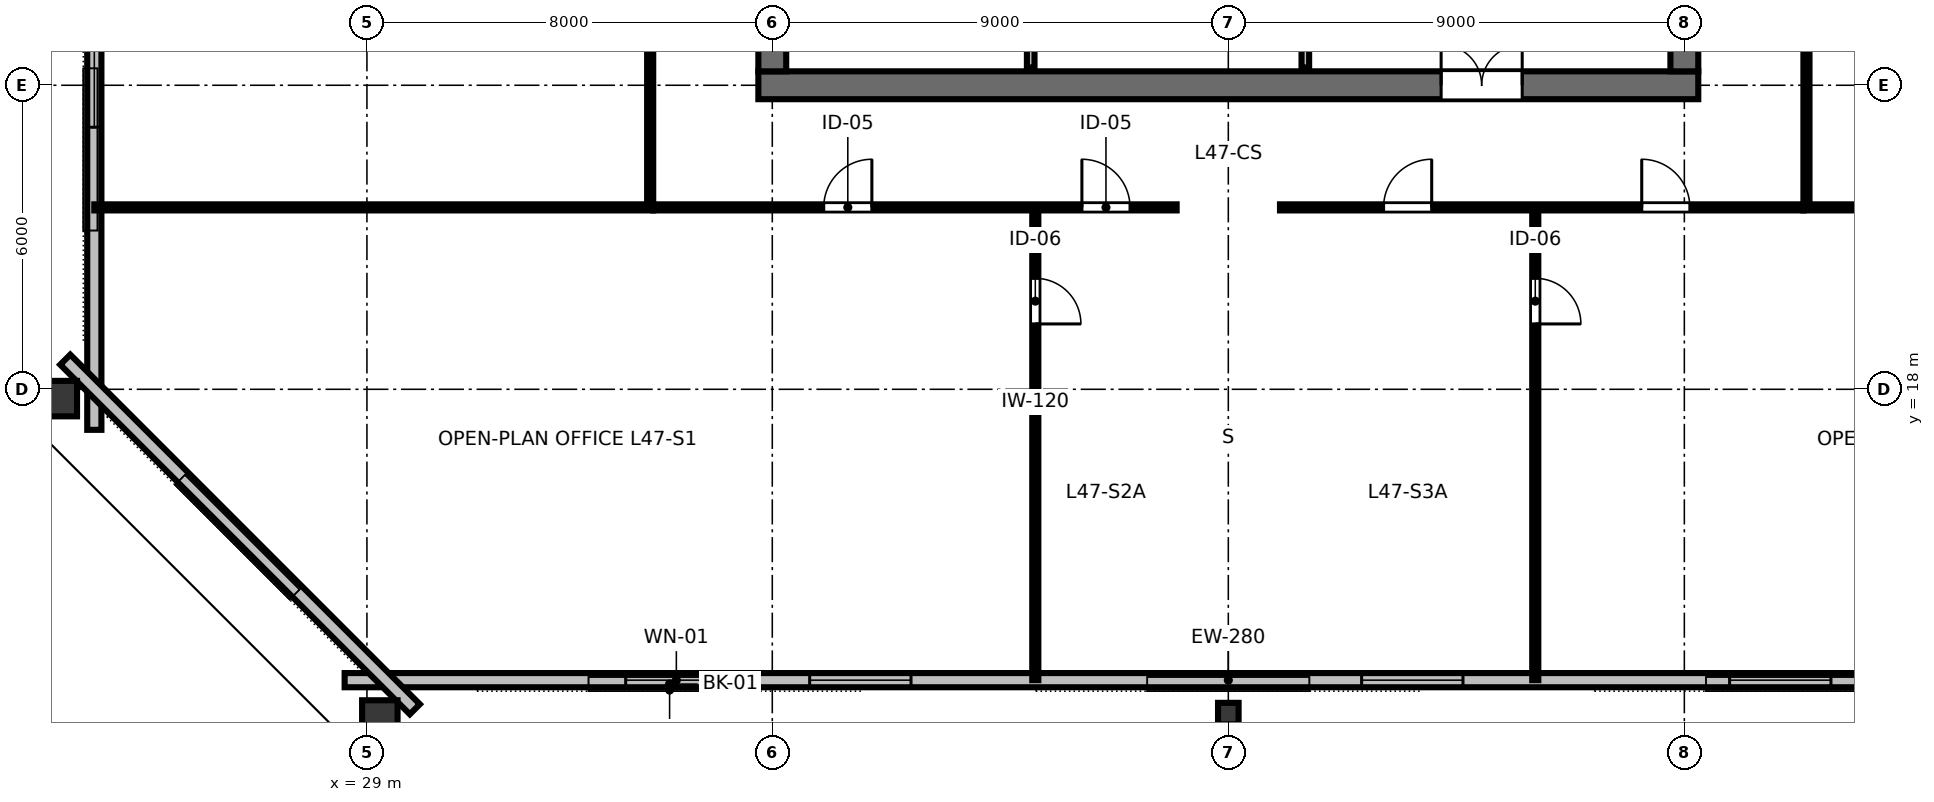
"""IFC4 building model, lengths in metres.
Left out: names, types, materials, properties, quantities, classifications, styles, units other than length and angle.
Written with IfcOpenShell. Run it as: python <this file> out.ifc"""

import sys

from ifc_helpers import new_model, si_unit, direction, frame, frame_2d, origin, origin_2d, place, context, subcontext, project, spatial, rectangle, hollow_rectangle, i_section, extrude, element, fill, save


model = new_model("IFC4")
c1 = context("Model", 3, precision=1e-05, world=origin(), true_north=direction((0.0, 1.0)))
c2 = subcontext(c1, "Body", "Model", "MODEL_VIEW")
j1 = project(units=[si_unit("LENGTHUNIT", "METRE"), si_unit("PLANEANGLEUNIT", "RADIAN")], contexts=[c1])
p1 = place(None, origin())
s1 = spatial("IfcSite", under=j1, at=p1, CompositionType="ELEMENT")
p2 = place(p1, origin())
s2 = spatial("IfcBuilding", under=s1, at=p2, CompositionType="ELEMENT")
p3 = place(p2, frame((0.0, 0.0, 180.6)))
s3 = spatial("IfcBuildingStorey", under=s2, at=p3, CompositionType="ELEMENT", Elevation=180.6)
p4 = place(p3, frame((36.725, 24.0, 0.0), z_axis=(0.0, 0.0, 1.0), x_axis=(1.0, 0.0, 0.0)))
e1 = element("IfcWall", 1, at=p4, inside=s3, PredefinedType="SHEAR", context=c2, shape_type="SweptSolid", body=[
    extrude(rectangle(XDim=18.55, YDim=0.55, at=frame_2d((9.275, 0.0))), origin(), (0.0, 0.0, 1.0), 3.36),
])
p5 = place(p4, frame((13.475, 0.0, 0.0)))
e2 = element("IfcOpeningElement", 2, at=p5, cuts=e1, PredefinedType="OPENING", context=c2, shape_type="SweptSolid", body=[
    extrude(rectangle(XDim=1.6, YDim=2.15, at=frame_2d((0.8, 1.075))), frame((0.0, 0.285, 0.0), z_axis=(0.0, -1.0, 0.0), x_axis=(1.0, 0.0, 0.0)), (0.0, 0.0, 1.0), 0.57),
])
p6 = place(p3, frame((37.0, 24.275, 0.0), z_axis=(0.0, 0.0, 1.0), x_axis=(0.0, 1.0, 0.0)))
e3 = element("IfcWall", 3, at=p6, inside=s3, PredefinedType="SHEAR", context=c2, shape_type="SweptSolid", body=[
    extrude(rectangle(XDim=15.45, YDim=0.55, at=frame_2d((7.725, 0.0))), origin(), (0.0, 0.0, 1.0), 3.36),
])
p7 = place(p6, frame((5.25, 0.0, 0.0)))
e4 = element("IfcOpeningElement", 4, at=p7, cuts=e3, PredefinedType="OPENING", context=c2, shape_type="SweptSolid", body=[
    extrude(rectangle(XDim=1.15, YDim=2.15, at=frame_2d((0.575, 1.075))), frame((0.0, 0.285, 0.0), z_axis=(0.0, -1.0, 0.0), x_axis=(1.0, 0.0, 0.0)), (0.0, 0.0, 1.0), 0.57),
])
p8 = place(p3, frame((55.0, 24.275, 0.0), z_axis=(0.0, 0.0, 1.0), x_axis=(0.0, 1.0, 0.0)))
e5 = element("IfcWall", 5, at=p8, inside=s3, PredefinedType="SHEAR", context=c2, shape_type="SweptSolid", body=[
    extrude(rectangle(XDim=15.45, YDim=0.55, at=frame_2d((7.725, 0.0))), origin(), (0.0, 0.0, 1.0), 3.36),
])
p9 = place(p8, frame((5.25, 0.0, 0.0)))
e6 = element("IfcOpeningElement", 6, at=p9, cuts=e5, PredefinedType="OPENING", context=c2, shape_type="SweptSolid", body=[
    extrude(rectangle(XDim=1.15, YDim=2.15, at=frame_2d((0.575, 1.075))), frame((0.0, 0.285, 0.0), z_axis=(0.0, -1.0, 0.0), x_axis=(1.0, 0.0, 0.0)), (0.0, 0.0, 1.0), 0.57),
])
p10 = place(p3, frame((29.255, 11.438, 0.0), z_axis=(0.0, 0.0, 1.0), x_axis=(1.0, 0.0, 0.0)))
e7 = element("IfcColumn", 7, at=p10, inside=s3, PredefinedType="COLUMN", context=c2, shape_type="SweptSolid", body=[
    extrude(hollow_rectangle(XDim=0.7, YDim=0.85, WallThickness=0.04, at=origin_2d()), origin(), (0.0, 0.0, 1.0), 3.358),
])
p11 = place(p3, frame((46.0, 11.6, 0.0), z_axis=(0.0, 0.0, 1.0), x_axis=(1.0, 0.0, 0.0)))
e8 = element("IfcColumn", 8, at=p11, inside=s3, PredefinedType="COLUMN", context=c2, shape_type="SweptSolid", body=[
    extrude(i_section(OverallWidth=0.406, OverallDepth=0.425, WebThickness=0.033, FlangeThickness=0.052, FilletRadius=0.025, at=origin_2d()), origin(), (0.0, 0.0, 1.0), 3.358),
])
p12 = place(p3, frame((22.854, 17.816, 0.0), z_axis=(0.0, 0.0, 1.0), x_axis=(0.0, 1.0, 0.0)))
e9 = element("IfcColumn", 9, at=p12, inside=s3, PredefinedType="COLUMN", context=c2, shape_type="SweptSolid", body=[
    extrude(hollow_rectangle(XDim=0.7, YDim=0.85, WallThickness=0.04, at=origin_2d()), origin(), (0.0, 0.0, 1.0), 3.358),
])
p13 = place(p3, frame((28.56, 12.26, 0.0), z_axis=(0.0, 0.0, 1.0), x_axis=(1.0, 0.0, 0.0)))
e10 = element("IfcWall", 10, at=p13, inside=s3, PredefinedType="STANDARD", context=c2, shape_type="SweptSolid", body=[
    extrude(rectangle(XDim=34.88, YDim=0.28, at=frame_2d((17.44, 0.0))), origin(), (0.0, 0.0, 1.0), 3.36),
])
p14 = place(p13, frame((5.547, 0.0, 0.8)))
e11 = element("IfcOpeningElement", 11, at=p14, cuts=e10, PredefinedType="OPENING", context=c2, shape_type="SweptSolid", body=[
    extrude(rectangle(XDim=2.0, YDim=1.95, at=frame_2d((1.0, 0.975))), frame((0.0, 0.15, 0.0), z_axis=(0.0, -1.0, 0.0), x_axis=(1.0, 0.0, 0.0)), (0.0, 0.0, 1.0), 0.3),
])
p15 = place(p13, frame((9.178, 0.0, 0.8)))
e12 = element("IfcOpeningElement", 12, at=p15, cuts=e10, PredefinedType="OPENING", context=c2, shape_type="SweptSolid", body=[
    extrude(rectangle(XDim=2.0, YDim=1.95, at=frame_2d((1.0, 0.975))), frame((0.0, 0.15, 0.0), z_axis=(0.0, -1.0, 0.0), x_axis=(1.0, 0.0, 0.0)), (0.0, 0.0, 1.0), 0.3),
])
p16 = place(p13, frame((20.071, 0.0, 0.8)))
e13 = element("IfcOpeningElement", 13, at=p16, cuts=e10, PredefinedType="OPENING", context=c2, shape_type="SweptSolid", body=[
    extrude(rectangle(XDim=2.0, YDim=1.95, at=frame_2d((1.0, 0.975))), frame((0.0, 0.15, 0.0), z_axis=(0.0, -1.0, 0.0), x_axis=(1.0, 0.0, 0.0)), (0.0, 0.0, 1.0), 0.3),
])
p17 = place(p13, frame((27.333, 0.0, 0.8)))
e14 = element("IfcOpeningElement", 14, at=p17, cuts=e10, PredefinedType="OPENING", context=c2, shape_type="SweptSolid", body=[
    extrude(rectangle(XDim=2.0, YDim=1.95, at=frame_2d((1.0, 0.975))), frame((0.0, 0.15, 0.0), z_axis=(0.0, -1.0, 0.0), x_axis=(1.0, 0.0, 0.0)), (0.0, 0.0, 1.0), 0.3),
])
p18 = place(p3, frame((23.62, 46.8, 0.0), z_axis=(0.0, 0.0, 1.0), x_axis=(0.0, -1.0, 0.0)))
e15 = element("IfcWall", 15, at=p18, inside=s3, PredefinedType="STANDARD", context=c2, shape_type="SweptSolid", body=[
    extrude(rectangle(XDim=29.6, YDim=0.28, at=frame_2d((14.8, 0.0))), origin(), (0.0, 0.0, 1.0), 3.36),
])
p19 = place(p18, frame((5.971, 0.0, 0.8)))
e16 = element("IfcOpeningElement", 16, at=p19, cuts=e15, PredefinedType="OPENING", context=c2, shape_type="SweptSolid", body=[
    extrude(rectangle(XDim=2.0, YDim=1.95, at=frame_2d((1.0, 0.975))), frame((0.0, 0.15, 0.0), z_axis=(0.0, -1.0, 0.0), x_axis=(1.0, 0.0, 0.0)), (0.0, 0.0, 1.0), 0.3),
])
p20 = place(p18, frame((9.886, 0.0, 0.8)))
e17 = element("IfcOpeningElement", 17, at=p20, cuts=e15, PredefinedType="OPENING", context=c2, shape_type="SweptSolid", body=[
    extrude(rectangle(XDim=2.0, YDim=1.95, at=frame_2d((1.0, 0.975))), frame((0.0, 0.15, 0.0), z_axis=(0.0, -1.0, 0.0), x_axis=(1.0, 0.0, 0.0)), (0.0, 0.0, 1.0), 0.3),
])
p21 = place(p18, frame((17.714, 0.0, 0.8)))
e18 = element("IfcOpeningElement", 18, at=p21, cuts=e15, PredefinedType="OPENING", context=c2, shape_type="SweptSolid", body=[
    extrude(rectangle(XDim=2.0, YDim=1.95, at=frame_2d((1.0, 0.975))), frame((0.0, 0.15, 0.0), z_axis=(0.0, -1.0, 0.0), x_axis=(1.0, 0.0, 0.0)), (0.0, 0.0, 1.0), 0.3),
])
p22 = place(p18, frame((21.629, 0.0, 0.8)))
e19 = element("IfcOpeningElement", 19, at=p22, cuts=e15, PredefinedType="OPENING", context=c2, shape_type="SweptSolid", body=[
    extrude(rectangle(XDim=2.0, YDim=1.95, at=frame_2d((1.0, 0.975))), frame((0.0, 0.15, 0.0), z_axis=(0.0, -1.0, 0.0), x_axis=(1.0, 0.0, 0.0)), (0.0, 0.0, 1.0), 0.3),
])
p23 = place(p3, frame((23.046, 18.585, 0.0), z_axis=(0.0, 0.0, 1.0), x_axis=(0.707106781187, -0.707106781187, 0.0)))
e20 = element("IfcWall", 20, at=p23, inside=s3, PredefinedType="STANDARD", context=c2, shape_type="SweptSolid", body=[
    extrude(rectangle(XDim=9.757, YDim=0.28, at=frame_2d((4.879, 0.0))), origin(), (0.0, 0.0, 1.0), 3.36),
])
p24 = place(p3, frame((42.1, 24.35, 0.0), z_axis=(0.0, 0.0, 1.0), x_axis=(0.0, 1.0, 0.0)))
e21 = element("IfcWall", 21, at=p24, inside=s3, PredefinedType="PARTITIONING", context=c2, shape_type="SweptSolid", body=[
    extrude(rectangle(XDim=3.9, YDim=0.15, at=frame_2d((1.95, 0.0))), origin(), (0.0, 0.0, 1.0), 3.36),
])
p25 = place(p24, frame((1.5, 0.0, 0.0)))
e22 = element("IfcOpeningElement", 22, at=p25, cuts=e21, PredefinedType="OPENING", context=c2, shape_type="SweptSolid", body=[
    extrude(rectangle(XDim=0.9, YDim=2.15, at=frame_2d((0.45, 1.075))), frame((0.0, 0.085, 0.0), z_axis=(0.0, -1.0, 0.0), x_axis=(1.0, 0.0, 0.0)), (0.0, 0.0, 1.0), 0.17),
])
p26 = place(p3, frame((47.52, 24.35, 0.0), z_axis=(0.0, 0.0, 1.0), x_axis=(0.0, 1.0, 0.0)))
e23 = element("IfcWall", 23, at=p26, inside=s3, PredefinedType="PARTITIONING", context=c2, shape_type="SweptSolid", body=[
    extrude(rectangle(XDim=3.9, YDim=0.15, at=frame_2d((1.95, 0.0))), origin(), (0.0, 0.0, 1.0), 3.36),
])
p27 = place(p26, frame((0.35, 0.0, 0.0)))
e24 = element("IfcOpeningElement", 24, at=p27, cuts=e23, PredefinedType="OPENING", context=c2, shape_type="SweptSolid", body=[
    extrude(rectangle(XDim=0.9, YDim=2.15, at=frame_2d((0.45, 1.075))), frame((0.0, 0.085, 0.0), z_axis=(0.0, -1.0, 0.0), x_axis=(1.0, 0.0, 0.0)), (0.0, 0.0, 1.0), 0.17),
])
p28 = place(p3, frame((42.191, 21.59, 0.0), z_axis=(0.0, 0.0, 1.0), x_axis=(0.0, -1.0, 0.0)))
e25 = element("IfcWall", 25, at=p28, inside=s3, PredefinedType="PARTITIONING", context=c2, shape_type="SweptSolid", body=[
    extrude(rectangle(XDim=9.33, YDim=0.12, at=frame_2d((4.665, 0.0))), origin(), (0.0, 0.0, 1.0), 2.64),
])
p29 = place(p28, frame((1.4, 0.0, 0.0)))
e26 = element("IfcOpeningElement", 26, at=p29, cuts=e25, PredefinedType="OPENING", context=c2, shape_type="SweptSolid", body=[
    extrude(rectangle(XDim=0.9, YDim=2.15, at=frame_2d((0.45, 1.075))), frame((0.0, 0.07, 0.0), z_axis=(0.0, -1.0, 0.0), x_axis=(1.0, 0.0, 0.0)), (0.0, 0.0, 1.0), 0.14),
])
p30 = place(p3, frame((52.058, 21.59, 0.0), z_axis=(0.0, 0.0, 1.0), x_axis=(0.0, -1.0, 0.0)))
e27 = element("IfcWall", 27, at=p30, inside=s3, PredefinedType="PARTITIONING", context=c2, shape_type="SweptSolid", body=[
    extrude(rectangle(XDim=9.33, YDim=0.12, at=frame_2d((4.665, 0.0))), origin(), (0.0, 0.0, 1.0), 2.64),
])
p31 = place(p30, frame((1.4, 0.0, 0.0)))
e28 = element("IfcOpeningElement", 28, at=p31, cuts=e27, PredefinedType="OPENING", context=c2, shape_type="SweptSolid", body=[
    extrude(rectangle(XDim=0.9, YDim=2.15, at=frame_2d((0.45, 1.075))), frame((0.0, 0.07, 0.0), z_axis=(0.0, -1.0, 0.0), x_axis=(1.0, 0.0, 0.0)), (0.0, 0.0, 1.0), 0.14),
])
p32 = place(p3, frame((34.65, 21.59, 0.0), z_axis=(0.0, 0.0, 1.0), x_axis=(1.0, 0.0, 0.0)))
e29 = element("IfcWall", 29, at=p32, inside=s3, PredefinedType="PARTITIONING", context=c2, shape_type="SweptSolid", body=[
    extrude(rectangle(XDim=10.33, YDim=0.12, at=frame_2d((5.165, 0.0))), origin(), (0.0, 0.0, 1.0), 2.64),
])
p33 = place(p32, frame((3.365, 0.0, 0.0)))
e30 = element("IfcOpeningElement", 30, at=p33, cuts=e29, PredefinedType="OPENING", context=c2, shape_type="SweptSolid", body=[
    extrude(rectangle(XDim=0.95, YDim=2.15, at=frame_2d((0.475, 1.075))), frame((0.0, 0.07, 0.0), z_axis=(0.0, -1.0, 0.0), x_axis=(1.0, 0.0, 0.0)), (0.0, 0.0, 1.0), 0.14),
])
p34 = place(p32, frame((8.46, 0.0, 0.0)))
e31 = element("IfcOpeningElement", 31, at=p34, cuts=e29, PredefinedType="OPENING", context=c2, shape_type="SweptSolid", body=[
    extrude(rectangle(XDim=0.95, YDim=2.15, at=frame_2d((0.475, 1.075))), frame((0.0, 0.07, 0.0), z_axis=(0.0, -1.0, 0.0), x_axis=(1.0, 0.0, 0.0)), (0.0, 0.0, 1.0), 0.14),
])
p35 = place(p3, frame((47.02, 21.59, 0.0), z_axis=(0.0, 0.0, 1.0), x_axis=(1.0, 0.0, 0.0)))
e32 = element("IfcWall", 32, at=p35, inside=s3, PredefinedType="PARTITIONING", context=c2, shape_type="SweptSolid", body=[
    extrude(rectangle(XDim=10.33, YDim=0.12, at=frame_2d((5.165, 0.0))), origin(), (0.0, 0.0, 1.0), 2.64),
])
p36 = place(p35, frame((2.044, 0.0, 0.0)))
e33 = element("IfcOpeningElement", 33, at=p36, cuts=e32, PredefinedType="OPENING", context=c2, shape_type="SweptSolid", body=[
    extrude(rectangle(XDim=0.95, YDim=2.15, at=frame_2d((0.475, 1.075))), frame((0.0, 0.07, 0.0), z_axis=(0.0, -1.0, 0.0), x_axis=(1.0, 0.0, 0.0)), (0.0, 0.0, 1.0), 0.14),
])
p37 = place(p35, frame((7.139, 0.0, 0.0)))
e34 = element("IfcOpeningElement", 34, at=p37, cuts=e32, PredefinedType="OPENING", context=c2, shape_type="SweptSolid", body=[
    extrude(rectangle(XDim=0.95, YDim=2.15, at=frame_2d((0.475, 1.075))), frame((0.0, 0.07, 0.0), z_axis=(0.0, -1.0, 0.0), x_axis=(1.0, 0.0, 0.0)), (0.0, 0.0, 1.0), 0.14),
])
p38 = place(p3, frame((34.59, 21.65, 0.0), z_axis=(0.0, 0.0, 1.0), x_axis=(0.0, 1.0, 0.0)))
e35 = element("IfcWall", 35, at=p38, inside=s3, PredefinedType="PARTITIONING", context=c2, shape_type="SweptSolid", body=[
    extrude(rectangle(XDim=20.7, YDim=0.12, at=frame_2d((10.35, 0.0))), origin(), (0.0, 0.0, 1.0), 2.64),
])
p39 = place(p38, frame((9.875, 0.0, 0.0)))
e36 = element("IfcOpeningElement", 36, at=p39, cuts=e35, PredefinedType="OPENING", context=c2, shape_type="SweptSolid", body=[
    extrude(rectangle(XDim=0.95, YDim=2.15, at=frame_2d((0.475, 1.075))), frame((0.0, 0.07, 0.0), z_axis=(0.0, -1.0, 0.0), x_axis=(1.0, 0.0, 0.0)), (0.0, 0.0, 1.0), 0.14),
])
p40 = place(p3, frame((57.41, 21.65, 0.0), z_axis=(0.0, 0.0, 1.0), x_axis=(0.0, 1.0, 0.0)))
e37 = element("IfcWall", 37, at=p40, inside=s3, PredefinedType="PARTITIONING", context=c2, shape_type="SweptSolid", body=[
    extrude(rectangle(XDim=20.7, YDim=0.12, at=frame_2d((10.35, 0.0))), origin(), (0.0, 0.0, 1.0), 2.64),
])
p41 = place(p40, frame((6.073, 0.0, 0.0)))
e38 = element("IfcOpeningElement", 38, at=p41, cuts=e37, PredefinedType="OPENING", context=c2, shape_type="SweptSolid", body=[
    extrude(rectangle(XDim=0.95, YDim=2.15, at=frame_2d((0.475, 1.075))), frame((0.0, 0.07, 0.0), z_axis=(0.0, -1.0, 0.0), x_axis=(1.0, 0.0, 0.0)), (0.0, 0.0, 1.0), 0.14),
])
p42 = place(p40, frame((16.223, 0.0, 0.0)))
e39 = element("IfcOpeningElement", 39, at=p42, cuts=e37, PredefinedType="OPENING", context=c2, shape_type="SweptSolid", body=[
    extrude(rectangle(XDim=0.95, YDim=2.15, at=frame_2d((0.475, 1.075))), frame((0.0, 0.07, 0.0), z_axis=(0.0, -1.0, 0.0), x_axis=(1.0, 0.0, 0.0)), (0.0, 0.0, 1.0), 0.14),
])
for number, where, z_axis, x_axis in (
    (40, (34.65, 21.59, 0.0), (0.0, 0.0, 1.0), (-1.0, 0.0, 0.0)),
    (41, (57.35, 21.59, 0.0), (0.0, 0.0, 1.0), (1.0, 0.0, 0.0)),
):
    element("IfcWall", number, at=place(p3, frame(where, z_axis=z_axis, x_axis=x_axis)), inside=s3, PredefinedType="PARTITIONING", context=c2, shape_type="SweptSolid", body=[
        extrude(rectangle(XDim=11.03, YDim=0.12, at=frame_2d((5.515, 0.0))), origin(), (0.0, 0.0, 1.0), 2.64),
    ])
p43 = place(p14, origin())
e42 = element("IfcWindow", 42, at=p43, inside=s3, PartitioningType="SINGLE_PANEL", PredefinedType="WINDOW", context=c2, shape_type="SweptSolid", body=[
    extrude(rectangle(XDim=2.0, YDim=1.95, at=frame_2d((1.0, 0.975))), frame((0.0, 0.03, 0.0), z_axis=(0.0, -1.0, 0.0), x_axis=(1.0, 0.0, 0.0)), (0.0, 0.0, 1.0), 0.06),
])
fill(e11, e42)
p44 = place(p15, origin())
e43 = element("IfcWindow", 43, at=p44, inside=s3, PartitioningType="SINGLE_PANEL", PredefinedType="WINDOW", context=c2, shape_type="SweptSolid", body=[
    extrude(rectangle(XDim=2.0, YDim=1.95, at=frame_2d((1.0, 0.975))), frame((0.0, 0.03, 0.0), z_axis=(0.0, -1.0, 0.0), x_axis=(1.0, 0.0, 0.0)), (0.0, 0.0, 1.0), 0.06),
])
fill(e12, e43)
p45 = place(p16, origin())
e44 = element("IfcWindow", 44, at=p45, inside=s3, PartitioningType="SINGLE_PANEL", PredefinedType="WINDOW", context=c2, shape_type="SweptSolid", body=[
    extrude(rectangle(XDim=2.0, YDim=1.95, at=frame_2d((1.0, 0.975))), frame((0.0, 0.03, 0.0), z_axis=(0.0, -1.0, 0.0), x_axis=(1.0, 0.0, 0.0)), (0.0, 0.0, 1.0), 0.06),
])
fill(e13, e44)
p46 = place(p17, origin())
e45 = element("IfcWindow", 45, at=p46, inside=s3, PartitioningType="SINGLE_PANEL", PredefinedType="WINDOW", context=c2, shape_type="SweptSolid", body=[
    extrude(rectangle(XDim=2.0, YDim=1.95, at=frame_2d((1.0, 0.975))), frame((0.0, 0.03, 0.0), z_axis=(0.0, -1.0, 0.0), x_axis=(1.0, 0.0, 0.0)), (0.0, 0.0, 1.0), 0.06),
])
fill(e14, e45)
p47 = place(p22, origin())
e46 = element("IfcWindow", 46, at=p47, inside=s3, PartitioningType="SINGLE_PANEL", PredefinedType="WINDOW", context=c2, shape_type="SweptSolid", body=[
    extrude(rectangle(XDim=2.0, YDim=1.95, at=frame_2d((1.0, 0.975))), frame((0.0, 0.03, 0.0), z_axis=(0.0, -1.0, 0.0), x_axis=(1.0, 0.0, 0.0)), (0.0, 0.0, 1.0), 0.06),
])
fill(e19, e46)
p48 = place(p5, origin())
e47 = element("IfcDoor", 47, at=p48, inside=s3, OperationType="DOUBLE_DOOR_SINGLE_SWING", PredefinedType="DOOR", context=c2, shape_type="SweptSolid", body=[
    extrude(rectangle(XDim=1.6, YDim=2.15, at=frame_2d((0.8, 1.075))), frame((0.0, 0.025, 0.0), z_axis=(0.0, -1.0, 0.0), x_axis=(1.0, 0.0, 0.0)), (0.0, 0.0, 1.0), 0.05),
])
fill(e2, e47)
p49 = place(p29, origin())
e48 = element("IfcDoor", 48, at=p49, inside=s3, OperationType="SINGLE_SWING_RIGHT", PredefinedType="DOOR", context=c2, shape_type="SweptSolid", body=[
    extrude(rectangle(XDim=0.9, YDim=2.15, at=frame_2d((0.45, 1.075))), frame((0.0, 0.025, 0.0), z_axis=(0.0, -1.0, 0.0), x_axis=(1.0, 0.0, 0.0)), (0.0, 0.0, 1.0), 0.05),
])
fill(e26, e48)
p50 = place(p31, origin())
e49 = element("IfcDoor", 49, at=p50, inside=s3, OperationType="SINGLE_SWING_RIGHT", PredefinedType="DOOR", context=c2, shape_type="SweptSolid", body=[
    extrude(rectangle(XDim=0.9, YDim=2.15, at=frame_2d((0.45, 1.075))), frame((0.0, 0.025, 0.0), z_axis=(0.0, -1.0, 0.0), x_axis=(1.0, 0.0, 0.0)), (0.0, 0.0, 1.0), 0.05),
])
fill(e28, e49)
p51 = place(p33, origin())
e50 = element("IfcDoor", 50, at=p51, inside=s3, OperationType="SINGLE_SWING_RIGHT", PredefinedType="DOOR", context=c2, shape_type="SweptSolid", body=[
    extrude(rectangle(XDim=0.95, YDim=2.15, at=frame_2d((0.475, 1.075))), frame((0.0, 0.025, 0.0), z_axis=(0.0, -1.0, 0.0), x_axis=(1.0, 0.0, 0.0)), (0.0, 0.0, 1.0), 0.05),
])
fill(e30, e50)
p52 = place(p34, origin())
e51 = element("IfcDoor", 51, at=p52, inside=s3, OperationType="SINGLE_SWING_LEFT", PredefinedType="DOOR", context=c2, shape_type="SweptSolid", body=[
    extrude(rectangle(XDim=0.95, YDim=2.15, at=frame_2d((0.475, 1.075))), frame((0.0, 0.025, 0.0), z_axis=(0.0, -1.0, 0.0), x_axis=(1.0, 0.0, 0.0)), (0.0, 0.0, 1.0), 0.05),
])
fill(e31, e51)
p53 = place(p36, origin())
e52 = element("IfcDoor", 52, at=p53, inside=s3, OperationType="SINGLE_SWING_RIGHT", PredefinedType="DOOR", context=c2, shape_type="SweptSolid", body=[
    extrude(rectangle(XDim=0.95, YDim=2.15, at=frame_2d((0.475, 1.075))), frame((0.0, 0.025, 0.0), z_axis=(0.0, -1.0, 0.0), x_axis=(1.0, 0.0, 0.0)), (0.0, 0.0, 1.0), 0.05),
])
fill(e33, e52)
p54 = place(p37, origin())
e53 = element("IfcDoor", 53, at=p54, inside=s3, OperationType="SINGLE_SWING_LEFT", PredefinedType="DOOR", context=c2, shape_type="SweptSolid", body=[
    extrude(rectangle(XDim=0.95, YDim=2.15, at=frame_2d((0.475, 1.075))), frame((0.0, 0.025, 0.0), z_axis=(0.0, -1.0, 0.0), x_axis=(1.0, 0.0, 0.0)), (0.0, 0.0, 1.0), 0.05),
])
fill(e34, e53)
save(model, sys.argv[1])
